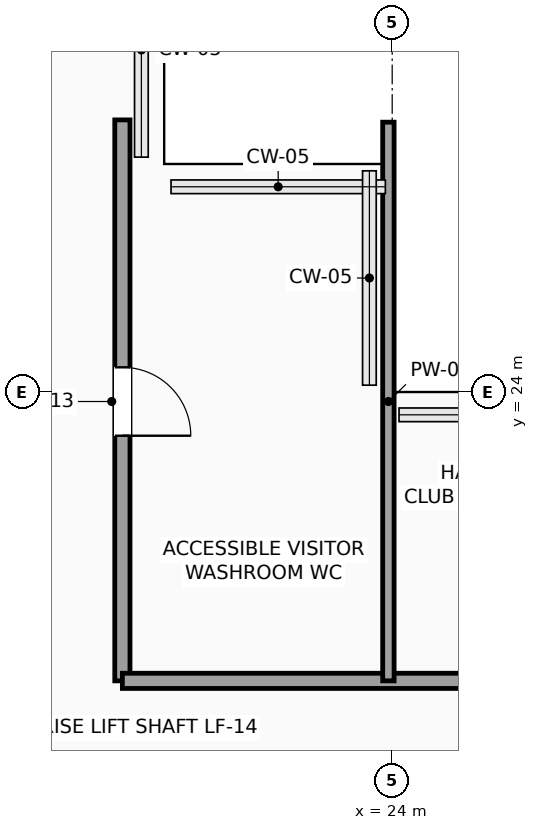
"""IFC4 building model, lengths in metres.
Left out: names, types, materials, properties, quantities, classifications, styles, units other than length and angle.
Written with IfcOpenShell. Run it as: python <this file> out.ifc"""

import sys

from ifc_helpers import new_model, si_unit, direction, frame, frame_2d, origin, place, context, subcontext, project, spatial, rectangle, extrude, element, fill, save


model = new_model("IFC4")
c1 = context("Model", 3, precision=1e-05, world=origin(), true_north=direction((0.0, 1.0)))
c2 = subcontext(c1, "Body", "Model", "MODEL_VIEW")
j1 = project(units=[si_unit("LENGTHUNIT", "METRE"), si_unit("PLANEANGLEUNIT", "RADIAN")], contexts=[c1])
p1 = place(None, origin())
s1 = spatial("IfcSite", under=j1, at=p1, CompositionType="ELEMENT")
p2 = place(p1, origin())
s2 = spatial("IfcBuilding", under=s1, at=p2, CompositionType="ELEMENT")
p3 = place(p2, frame((0.0, 0.0, 239.7)))
s3 = spatial("IfcBuildingStorey", under=s2, at=p3, CompositionType="ELEMENT", Elevation=239.7)
p4 = place(p3, frame((20.45, 27.58, 0.0), z_axis=(0.0, 0.0, 1.0), x_axis=(0.0, -1.0, 0.0)))
e1 = element("IfcWall", 1, at=p4, inside=s3, PredefinedType="PARTITIONING", context=c2, shape_type="SweptSolid", body=[
    extrude(rectangle(XDim=7.38, YDim=0.2, at=frame_2d((3.69, 0.0))), origin(), (0.0, 0.0, 1.0), 3.3),
])
p5 = place(p4, frame((3.255, 0.0, 0.0)))
e2 = element("IfcOpeningElement", 2, at=p5, cuts=e1, PredefinedType="OPENING", context=c2, shape_type="SweptSolid", body=[
    extrude(rectangle(XDim=0.9, YDim=2.1, at=frame_2d((0.45, 1.05))), frame((0.0, 0.11, 0.0), z_axis=(0.0, -1.0, 0.0), x_axis=(1.0, 0.0, 0.0)), (0.0, 0.0, 1.0), 0.22),
])
p6 = place(p3, frame((20.45, 20.2, 0.0), z_axis=(0.0, 0.0, 1.0), x_axis=(1.0, 0.0, 0.0)))
e3 = element("IfcWall", 3, at=p6, inside=s3, PredefinedType="PARTITIONING", context=c2, shape_type="SweptSolid", body=[
    extrude(rectangle(XDim=13.13, YDim=0.2, at=frame_2d((6.565, 0.0))), origin(), (0.0, 0.0, 1.0), 3.3),
])
p7 = place(p6, frame((4.675, 0.0, 0.0)))
e4 = element("IfcOpeningElement", 4, at=p7, cuts=e3, PredefinedType="OPENING", context=c2, shape_type="SweptSolid", body=[
    extrude(rectangle(XDim=1.1, YDim=2.25, at=frame_2d((0.55, 1.125))), frame((0.0, 0.11, 0.0), z_axis=(0.0, -1.0, 0.0), x_axis=(1.0, 0.0, 0.0)), (0.0, 0.0, 1.0), 0.22),
])
p8 = place(p6, frame((7.85, 0.0, 0.0)))
e5 = element("IfcOpeningElement", 5, at=p8, cuts=e3, PredefinedType="OPENING", context=c2, shape_type="SweptSolid", body=[
    extrude(rectangle(XDim=1.1, YDim=2.25, at=frame_2d((0.55, 1.125))), frame((0.0, 0.11, 0.0), z_axis=(0.0, -1.0, 0.0), x_axis=(1.0, 0.0, 0.0)), (0.0, 0.0, 1.0), 0.22),
])
p9 = place(p6, frame((11.025, 0.0, 0.0)))
e6 = element("IfcOpeningElement", 6, at=p9, cuts=e3, PredefinedType="OPENING", context=c2, shape_type="SweptSolid", body=[
    extrude(rectangle(XDim=1.1, YDim=2.25, at=frame_2d((0.55, 1.125))), frame((0.0, 0.11, 0.0), z_axis=(0.0, -1.0, 0.0), x_axis=(1.0, 0.0, 0.0)), (0.0, 0.0, 1.0), 0.22),
])
p10 = place(p3, frame((23.95, 20.2, 0.0), z_axis=(0.0, 0.0, 1.0), x_axis=(0.0, 1.0, 0.0)))
e7 = element("IfcWall", 7, at=p10, inside=s3, PredefinedType="PARTITIONING", context=c2, shape_type="SweptSolid", body=[
    extrude(rectangle(XDim=7.35, YDim=0.15, at=frame_2d((3.675, 0.0))), origin(), (0.0, 0.0, 1.0), 3.3),
])
p11 = place(p5, origin())
e8 = element("IfcDoor", 8, at=p11, inside=s3, OperationType="SINGLE_SWING_RIGHT", PredefinedType="DOOR", context=c2, shape_type="SweptSolid", body=[
    extrude(rectangle(XDim=0.9, YDim=2.1, at=frame_2d((0.45, 1.05))), frame((0.0, 0.025, 0.0), z_axis=(0.0, -1.0, 0.0), x_axis=(1.0, 0.0, 0.0)), (0.0, 0.0, 1.0), 0.05),
])
fill(e2, e8)
save(model, sys.argv[1])
